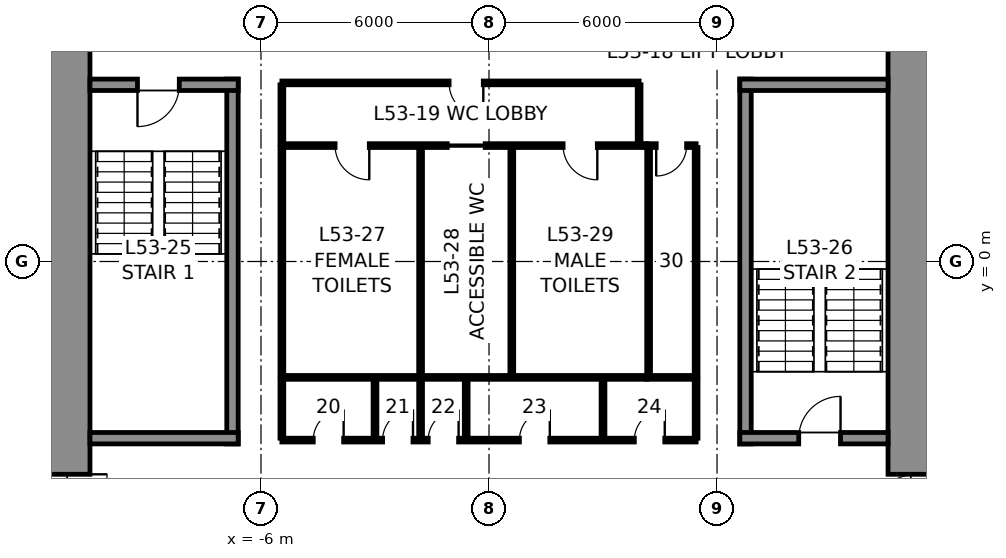
"""IFC4 building model, lengths in metres.
Left out: names, types, materials, properties, quantities, classifications, styles, units other than length and angle.
Written with IfcOpenShell. Run it as: python <this file> out.ifc"""

import sys

from ifc_helpers import new_model, si_unit, direction, frame, frame_2d, origin, place, context, subcontext, project, spatial, rectangle, extrude, element, fill, save


model = new_model("IFC4")
c1 = context("Model", 3, precision=1e-05, world=origin(), true_north=direction((0.0, 1.0)))
c2 = subcontext(c1, "Body", "Model", "MODEL_VIEW")
j1 = project(units=[si_unit("LENGTHUNIT", "METRE"), si_unit("PLANEANGLEUNIT", "RADIAN")], contexts=[c1])
p1 = place(None, origin())
s1 = spatial("IfcSite", under=j1, at=p1, CompositionType="ELEMENT")
p2 = place(p1, origin())
s2 = spatial("IfcBuilding", under=s1, at=p2, CompositionType="ELEMENT")
p3 = place(p2, frame((0.0, 0.0, 241.8)))
s3 = spatial("IfcBuildingStorey", under=s2, at=p3, CompositionType="ELEMENT", Elevation=241.8)
p4 = place(p3, frame((11.25, 10.5, 0.0), z_axis=(0.0, 0.0, 1.0), x_axis=(0.0, -1.0, 0.0)))
e1 = element("IfcWall", 1, at=p4, inside=s3, PredefinedType="SHEAR", context=c2, shape_type="SweptSolid", body=[
    extrude(rectangle(XDim=21.0, YDim=1.5, at=frame_2d((10.5, 0.0))), origin(), (0.0, 0.0, 1.0), 4.0),
])
p5 = place(p4, frame((3.7, 0.0, 0.0)))
e2 = element("IfcOpeningElement", 2, at=p5, cuts=e1, PredefinedType="OPENING", context=c2, shape_type="SweptSolid", body=[
    extrude(rectangle(XDim=1.2, YDim=2.3, at=frame_2d((0.6, 1.15))), frame((0.0, 0.76, 0.0), z_axis=(0.0, -1.0, 0.0), x_axis=(1.0, 0.0, 0.0)), (0.0, 0.0, 1.0), 1.52),
])
p6 = place(p4, frame((16.1, 0.0, 0.0)))
e3 = element("IfcOpeningElement", 3, at=p6, cuts=e1, PredefinedType="OPENING", context=c2, shape_type="SweptSolid", body=[
    extrude(rectangle(XDim=1.2, YDim=2.3, at=frame_2d((0.6, 1.15))), frame((0.0, 0.76, 0.0), z_axis=(0.0, -1.0, 0.0), x_axis=(1.0, 0.0, 0.0)), (0.0, 0.0, 1.0), 1.52),
])
p7 = place(p3, frame((-11.25, -10.5, 0.0), z_axis=(0.0, 0.0, 1.0), x_axis=(0.0, 1.0, 0.0)))
e4 = element("IfcWall", 4, at=p7, inside=s3, PredefinedType="SHEAR", context=c2, shape_type="SweptSolid", body=[
    extrude(rectangle(XDim=21.0, YDim=1.5, at=frame_2d((10.5, 0.0))), origin(), (0.0, 0.0, 1.0), 4.0),
])
p8 = place(p7, frame((16.1, 0.0, 0.0)))
e5 = element("IfcOpeningElement", 5, at=p8, cuts=e4, PredefinedType="OPENING", context=c2, shape_type="SweptSolid", body=[
    extrude(rectangle(XDim=1.2, YDim=2.3, at=frame_2d((0.6, 1.15))), frame((0.0, 0.76, 0.0), z_axis=(0.0, -1.0, 0.0), x_axis=(1.0, 0.0, 0.0)), (0.0, 0.0, 1.0), 1.52),
])
p9 = place(p7, frame((3.7, 0.0, 0.0)))
e6 = element("IfcOpeningElement", 6, at=p9, cuts=e4, PredefinedType="OPENING", context=c2, shape_type="SweptSolid", body=[
    extrude(rectangle(XDim=1.2, YDim=2.3, at=frame_2d((0.6, 1.15))), frame((0.0, 0.76, 0.0), z_axis=(0.0, -1.0, 0.0), x_axis=(1.0, 0.0, 0.0)), (0.0, 0.0, 1.0), 1.52),
])
p10 = place(p3, frame((-6.75, -4.8, 0.0), z_axis=(0.0, 0.0, 1.0), x_axis=(0.0, 1.0, 0.0)))
e7 = element("IfcWall", 7, at=p10, inside=s3, PredefinedType="SOLIDWALL", context=c2, shape_type="SweptSolid", body=[
    extrude(rectangle(XDim=9.6, YDim=0.3, at=frame_2d((4.8, 0.0))), origin(), (0.0, 0.0, 1.0), 3.75),
])
p11 = place(p3, frame((-10.5, 4.65, 0.0), z_axis=(0.0, 0.0, 1.0), x_axis=(1.0, 0.0, 0.0)))
e8 = element("IfcWall", 8, at=p11, inside=s3, PredefinedType="SOLIDWALL", context=c2, shape_type="SweptSolid", body=[
    extrude(rectangle(XDim=3.9, YDim=0.3, at=frame_2d((1.95, 0.0))), origin(), (0.0, 0.0, 1.0), 3.75),
])
p12 = place(p11, frame((1.25, 0.0, 0.0)))
e9 = element("IfcOpeningElement", 9, at=p12, cuts=e8, PredefinedType="OPENING", context=c2, shape_type="SweptSolid", body=[
    extrude(rectangle(XDim=1.1, YDim=2.3, at=frame_2d((0.55, 1.15))), frame((0.0, 0.16, 0.0), z_axis=(0.0, -1.0, 0.0), x_axis=(1.0, 0.0, 0.0)), (0.0, 0.0, 1.0), 0.32),
])
p13 = place(p3, frame((-6.6, -4.65, 0.0), z_axis=(0.0, 0.0, 1.0), x_axis=(-1.0, 0.0, 0.0)))
e10 = element("IfcWall", 10, at=p13, inside=s3, PredefinedType="SOLIDWALL", context=c2, shape_type="SweptSolid", body=[
    extrude(rectangle(XDim=3.9, YDim=0.3, at=frame_2d((1.95, 0.0))), origin(), (0.0, 0.0, 1.0), 3.75),
])
p14 = place(p3, frame((6.75, -4.8, 0.0), z_axis=(0.0, 0.0, 1.0), x_axis=(0.0, 1.0, 0.0)))
e11 = element("IfcWall", 11, at=p14, inside=s3, PredefinedType="SOLIDWALL", context=c2, shape_type="SweptSolid", body=[
    extrude(rectangle(XDim=9.6, YDim=0.3, at=frame_2d((4.8, 0.0))), origin(), (0.0, 0.0, 1.0), 3.75),
])
p15 = place(p3, frame((6.6, 4.65, 0.0), z_axis=(0.0, 0.0, 1.0), x_axis=(1.0, 0.0, 0.0)))
e12 = element("IfcWall", 12, at=p15, inside=s3, PredefinedType="SOLIDWALL", context=c2, shape_type="SweptSolid", body=[
    extrude(rectangle(XDim=3.9, YDim=0.3, at=frame_2d((1.95, 0.0))), origin(), (0.0, 0.0, 1.0), 3.75),
])
p16 = place(p3, frame((10.5, -4.65, 0.0), z_axis=(0.0, 0.0, 1.0), x_axis=(-1.0, 0.0, 0.0)))
e13 = element("IfcWall", 13, at=p16, inside=s3, PredefinedType="SOLIDWALL", context=c2, shape_type="SweptSolid", body=[
    extrude(rectangle(XDim=3.9, YDim=0.3, at=frame_2d((1.95, 0.0))), origin(), (0.0, 0.0, 1.0), 3.75),
])
p17 = place(p16, frame((1.25, 0.0, 0.0)))
e14 = element("IfcOpeningElement", 14, at=p17, cuts=e13, PredefinedType="OPENING", context=c2, shape_type="SweptSolid", body=[
    extrude(rectangle(XDim=1.1, YDim=2.3, at=frame_2d((0.55, 1.15))), frame((0.0, 0.16, 0.0), z_axis=(0.0, -1.0, 0.0), x_axis=(1.0, 0.0, 0.0)), (0.0, 0.0, 1.0), 0.32),
])
p18 = place(p3, frame((-5.45, 3.05, 0.0), z_axis=(0.0, 0.0, 1.0), x_axis=(1.0, 0.0, 0.0)))
e15 = element("IfcWall", 15, at=p18, inside=s3, PredefinedType="PARTITIONING", context=c2, shape_type="SweptSolid", body=[
    extrude(rectangle(XDim=9.6, YDim=0.1, at=frame_2d((4.8, 0.0))), origin(), (0.0, 0.0, 1.0), 3.75),
])
p19 = place(p18, frame((1.4, 0.0, 0.0)))
e16 = element("IfcOpeningElement", 16, at=p19, cuts=e15, PredefinedType="OPENING", context=c2, shape_type="SweptSolid", body=[
    extrude(rectangle(XDim=0.9, YDim=2.3, at=frame_2d((0.45, 1.15))), frame((0.0, 0.06, 0.0), z_axis=(0.0, -1.0, 0.0), x_axis=(1.0, 0.0, 0.0)), (0.0, 0.0, 1.0), 0.12),
])
p20 = place(p18, frame((4.35, 0.0, 0.0)))
e17 = element("IfcOpeningElement", 17, at=p20, cuts=e15, PredefinedType="OPENING", context=c2, shape_type="SweptSolid", body=[
    extrude(rectangle(XDim=1.0, YDim=2.3, at=frame_2d((0.5, 1.15))), frame((0.0, 0.06, 0.0), z_axis=(0.0, -1.0, 0.0), x_axis=(1.0, 0.0, 0.0)), (0.0, 0.0, 1.0), 0.12),
])
p21 = place(p18, frame((7.4, 0.0, 0.0)))
e18 = element("IfcOpeningElement", 18, at=p21, cuts=e15, PredefinedType="OPENING", context=c2, shape_type="SweptSolid", body=[
    extrude(rectangle(XDim=0.9, YDim=2.3, at=frame_2d((0.45, 1.15))), frame((0.0, 0.06, 0.0), z_axis=(0.0, -1.0, 0.0), x_axis=(1.0, 0.0, 0.0)), (0.0, 0.0, 1.0), 0.12),
])
p22 = place(p3, frame((4.15, 3.05, 0.0), z_axis=(0.0, 0.0, 1.0), x_axis=(1.0, 0.0, 0.0)))
e19 = element("IfcWall", 19, at=p22, inside=s3, PredefinedType="PARTITIONING", context=c2, shape_type="SweptSolid", body=[
    extrude(rectangle(XDim=1.3, YDim=0.1, at=frame_2d((0.65, 0.0))), origin(), (0.0, 0.0, 1.0), 3.75),
])
p23 = place(p22, frame((0.25, 0.0, 0.0)))
e20 = element("IfcOpeningElement", 20, at=p23, cuts=e19, PredefinedType="OPENING", context=c2, shape_type="SweptSolid", body=[
    extrude(rectangle(XDim=0.8, YDim=2.3, at=frame_2d((0.4, 1.15))), frame((0.0, 0.06, 0.0), z_axis=(0.0, -1.0, 0.0), x_axis=(1.0, 0.0, 0.0)), (0.0, 0.0, 1.0), 0.12),
])
p24 = place(p3, frame((4.15, -3.05, 0.0), z_axis=(0.0, 0.0, 1.0), x_axis=(-1.0, 0.0, 0.0)))
e21 = element("IfcWall", 21, at=p24, inside=s3, PredefinedType="PARTITIONING", context=c2, shape_type="SweptSolid", body=[
    extrude(rectangle(XDim=9.6, YDim=0.1, at=frame_2d((4.8, 0.0))), origin(), (0.0, 0.0, 1.0), 3.75),
])
p25 = place(p3, frame((5.45, -3.05, 0.0), z_axis=(0.0, 0.0, 1.0), x_axis=(-1.0, 0.0, 0.0)))
e22 = element("IfcWall", 22, at=p25, inside=s3, PredefinedType="PARTITIONING", context=c2, shape_type="SweptSolid", body=[
    extrude(rectangle(XDim=1.3, YDim=0.1, at=frame_2d((0.65, 0.0))), origin(), (0.0, 0.0, 1.0), 3.75),
])
for number, where, z_axis, x_axis in (
    (23, (5.45, 3.0, 0.0), (0.0, 0.0, 1.0), (0.0, -1.0, 0.0)),
    (24, (-5.45, -3.0, 0.0), (0.0, 0.0, 1.0), (0.0, 1.0, 0.0)),
    (25, (-1.8, -3.0, 0.0), (0.0, 0.0, 1.0), (0.0, 1.0, 0.0)),
    (26, (0.6, -3.0, 0.0), (0.0, 0.0, 1.0), (0.0, 1.0, 0.0)),
    (27, (4.2, -3.0, 0.0), (0.0, 0.0, 1.0), (0.0, 1.0, 0.0)),
):
    element("IfcWall", number, at=place(p3, frame(where, z_axis=z_axis, x_axis=x_axis)), inside=s3, PredefinedType="PARTITIONING", context=c2, shape_type="SweptSolid", body=[
        extrude(rectangle(XDim=6.0, YDim=0.1, at=frame_2d((3.0, 0.0))), origin(), (0.0, 0.0, 1.0), 3.75),
    ])
p26 = place(p3, frame((-5.45, 4.7, 0.0), z_axis=(0.0, 0.0, 1.0), x_axis=(1.0, 0.0, 0.0)))
e28 = element("IfcWall", 28, at=p26, inside=s3, PredefinedType="PARTITIONING", context=c2, shape_type="SweptSolid", body=[
    extrude(rectangle(XDim=9.4, YDim=0.1, at=frame_2d((4.7, 0.0))), origin(), (0.0, 0.0, 1.0), 3.75),
])
p27 = place(p26, frame((4.4, 0.0, 0.0)))
e29 = element("IfcOpeningElement", 29, at=p27, cuts=e28, PredefinedType="OPENING", context=c2, shape_type="SweptSolid", body=[
    extrude(rectangle(XDim=0.9, YDim=2.3, at=frame_2d((0.45, 1.15))), frame((0.0, 0.06, 0.0), z_axis=(0.0, -1.0, 0.0), x_axis=(1.0, 0.0, 0.0)), (0.0, 0.0, 1.0), 0.12),
])
for number, where, z_axis, x_axis in (
    (30, (-5.45, 3.1, 0.0), (0.0, 0.0, 1.0), (0.0, 1.0, 0.0)),
    (31, (3.95, 3.1, 0.0), (0.0, 0.0, 1.0), (0.0, 1.0, 0.0)),
):
    element("IfcWall", number, at=place(p3, frame(where, z_axis=z_axis, x_axis=x_axis)), inside=s3, PredefinedType="PARTITIONING", context=c2, shape_type="SweptSolid", body=[
        extrude(rectangle(XDim=1.55, YDim=0.1, at=frame_2d((0.775, 0.0))), origin(), (0.0, 0.0, 1.0), 3.75),
    ])
p28 = place(p3, frame((5.45, -4.7, 0.0), z_axis=(0.0, 0.0, 1.0), x_axis=(-1.0, 0.0, 0.0)))
e32 = element("IfcWall", 32, at=p28, inside=s3, PredefinedType="PARTITIONING", context=c2, shape_type="SweptSolid", body=[
    extrude(rectangle(XDim=10.9, YDim=0.1, at=frame_2d((5.45, 0.0))), origin(), (0.0, 0.0, 1.0), 3.75),
])
p29 = place(p28, frame((9.275, 0.0, 0.0)))
e33 = element("IfcOpeningElement", 33, at=p29, cuts=e32, PredefinedType="OPENING", context=c2, shape_type="SweptSolid", body=[
    extrude(rectangle(XDim=0.8, YDim=2.3, at=frame_2d((0.4, 1.15))), frame((0.0, 0.06, 0.0), z_axis=(0.0, -1.0, 0.0), x_axis=(1.0, 0.0, 0.0)), (0.0, 0.0, 1.0), 0.12),
])
p30 = place(p28, frame((7.45, 0.0, 0.0)))
e34 = element("IfcOpeningElement", 34, at=p30, cuts=e32, PredefinedType="OPENING", context=c2, shape_type="SweptSolid", body=[
    extrude(rectangle(XDim=0.8, YDim=2.3, at=frame_2d((0.4, 1.15))), frame((0.0, 0.06, 0.0), z_axis=(0.0, -1.0, 0.0), x_axis=(1.0, 0.0, 0.0)), (0.0, 0.0, 1.0), 0.12),
])
p31 = place(p28, frame((6.25, 0.0, 0.0)))
e35 = element("IfcOpeningElement", 35, at=p31, cuts=e32, PredefinedType="OPENING", context=c2, shape_type="SweptSolid", body=[
    extrude(rectangle(XDim=0.8, YDim=2.3, at=frame_2d((0.4, 1.15))), frame((0.0, 0.06, 0.0), z_axis=(0.0, -1.0, 0.0), x_axis=(1.0, 0.0, 0.0)), (0.0, 0.0, 1.0), 0.12),
])
p32 = place(p28, frame((3.85, 0.0, 0.0)))
e36 = element("IfcOpeningElement", 36, at=p32, cuts=e32, PredefinedType="OPENING", context=c2, shape_type="SweptSolid", body=[
    extrude(rectangle(XDim=0.8, YDim=2.3, at=frame_2d((0.4, 1.15))), frame((0.0, 0.06, 0.0), z_axis=(0.0, -1.0, 0.0), x_axis=(1.0, 0.0, 0.0)), (0.0, 0.0, 1.0), 0.12),
])
p33 = place(p28, frame((0.825, 0.0, 0.0)))
e37 = element("IfcOpeningElement", 37, at=p33, cuts=e32, PredefinedType="OPENING", context=c2, shape_type="SweptSolid", body=[
    extrude(rectangle(XDim=0.8, YDim=2.3, at=frame_2d((0.4, 1.15))), frame((0.0, 0.06, 0.0), z_axis=(0.0, -1.0, 0.0), x_axis=(1.0, 0.0, 0.0)), (0.0, 0.0, 1.0), 0.12),
])
for number, where, z_axis, x_axis in (
    (38, (-5.45, -3.1, 0.0), (0.0, 0.0, 1.0), (0.0, -1.0, 0.0)),
    (39, (5.45, -3.1, 0.0), (0.0, 0.0, 1.0), (0.0, -1.0, 0.0)),
    (40, (-3.0, -3.1, 0.0), (0.0, 0.0, 1.0), (0.0, -1.0, 0.0)),
    (41, (-1.8, -3.1, 0.0), (0.0, 0.0, 1.0), (0.0, -1.0, 0.0)),
    (42, (-0.6, -3.1, 0.0), (0.0, 0.0, 1.0), (0.0, -1.0, 0.0)),
    (43, (3.0, -3.1, 0.0), (0.0, 0.0, 1.0), (0.0, -1.0, 0.0)),
):
    element("IfcWall", number, at=place(p3, frame(where, z_axis=z_axis, x_axis=x_axis)), inside=s3, PredefinedType="PARTITIONING", context=c2, shape_type="SweptSolid", body=[
        extrude(rectangle(XDim=1.55, YDim=0.1, at=frame_2d((0.775, 0.0))), origin(), (0.0, 0.0, 1.0), 3.75),
    ])
p34 = place(p12, frame((1.1, 0.0, 0.0), z_axis=(0.0, 0.0, 1.0), x_axis=(-1.0, 0.0, 0.0)))
e44 = element("IfcDoor", 44, at=p34, inside=s3, OperationType="SINGLE_SWING_RIGHT", PredefinedType="DOOR", context=c2, shape_type="SweptSolid", body=[
    extrude(rectangle(XDim=1.1, YDim=2.3, at=frame_2d((0.55, 1.15))), frame((0.0, 0.025, 0.0), z_axis=(0.0, -1.0, 0.0), x_axis=(1.0, 0.0, 0.0)), (0.0, 0.0, 1.0), 0.05),
])
fill(e9, e44)
p35 = place(p17, frame((1.1, 0.0, 0.0), z_axis=(0.0, 0.0, 1.0), x_axis=(-1.0, 0.0, 0.0)))
e45 = element("IfcDoor", 45, at=p35, inside=s3, OperationType="SINGLE_SWING_RIGHT", PredefinedType="DOOR", context=c2, shape_type="SweptSolid", body=[
    extrude(rectangle(XDim=1.1, YDim=2.3, at=frame_2d((0.55, 1.15))), frame((0.0, 0.025, 0.0), z_axis=(0.0, -1.0, 0.0), x_axis=(1.0, 0.0, 0.0)), (0.0, 0.0, 1.0), 0.05),
])
fill(e14, e45)
p36 = place(p19, frame((0.9, 0.0, 0.0), z_axis=(0.0, 0.0, 1.0), x_axis=(-1.0, 0.0, 0.0)))
e46 = element("IfcDoor", 46, at=p36, inside=s3, OperationType="SINGLE_SWING_LEFT", PredefinedType="DOOR", context=c2, shape_type="SweptSolid", body=[
    extrude(rectangle(XDim=0.9, YDim=2.3, at=frame_2d((0.45, 1.15))), frame((0.0, 0.025, 0.0), z_axis=(0.0, -1.0, 0.0), x_axis=(1.0, 0.0, 0.0)), (0.0, 0.0, 1.0), 0.05),
])
fill(e16, e46)
p37 = place(p20, frame((1.0, 0.0, 0.0), z_axis=(0.0, 0.0, 1.0), x_axis=(-1.0, 0.0, 0.0)))
e47 = element("IfcDoor", 47, at=p37, inside=s3, OperationType="SLIDING_TO_LEFT", PredefinedType="DOOR", context=c2, shape_type="SweptSolid", body=[
    extrude(rectangle(XDim=1.0, YDim=2.3, at=frame_2d((0.5, 1.15))), frame((0.0, 0.025, 0.0), z_axis=(0.0, -1.0, 0.0), x_axis=(1.0, 0.0, 0.0)), (0.0, 0.0, 1.0), 0.05),
])
fill(e17, e47)
p38 = place(p21, frame((0.9, 0.0, 0.0), z_axis=(0.0, 0.0, 1.0), x_axis=(-1.0, 0.0, 0.0)))
e48 = element("IfcDoor", 48, at=p38, inside=s3, OperationType="SINGLE_SWING_LEFT", PredefinedType="DOOR", context=c2, shape_type="SweptSolid", body=[
    extrude(rectangle(XDim=0.9, YDim=2.3, at=frame_2d((0.45, 1.15))), frame((0.0, 0.025, 0.0), z_axis=(0.0, -1.0, 0.0), x_axis=(1.0, 0.0, 0.0)), (0.0, 0.0, 1.0), 0.05),
])
fill(e18, e48)
p39 = place(p23, frame((0.8, 0.0, 0.0), z_axis=(0.0, 0.0, 1.0), x_axis=(-1.0, 0.0, 0.0)))
e49 = element("IfcDoor", 49, at=p39, inside=s3, OperationType="SINGLE_SWING_RIGHT", PredefinedType="DOOR", context=c2, shape_type="SweptSolid", body=[
    extrude(rectangle(XDim=0.8, YDim=2.3, at=frame_2d((0.4, 1.15))), frame((0.0, 0.025, 0.0), z_axis=(0.0, -1.0, 0.0), x_axis=(1.0, 0.0, 0.0)), (0.0, 0.0, 1.0), 0.05),
])
fill(e20, e49)
p40 = place(p27, frame((0.9, 0.0, 0.0), z_axis=(0.0, 0.0, 1.0), x_axis=(-1.0, 0.0, 0.0)))
e50 = element("IfcDoor", 50, at=p40, inside=s3, OperationType="SINGLE_SWING_LEFT", PredefinedType="DOOR", context=c2, shape_type="SweptSolid", body=[
    extrude(rectangle(XDim=0.9, YDim=2.3, at=frame_2d((0.45, 1.15))), frame((0.0, 0.025, 0.0), z_axis=(0.0, -1.0, 0.0), x_axis=(1.0, 0.0, 0.0)), (0.0, 0.0, 1.0), 0.05),
])
fill(e29, e50)
p41 = place(p29, frame((0.8, 0.0, 0.0), z_axis=(0.0, 0.0, 1.0), x_axis=(-1.0, 0.0, 0.0)))
e51 = element("IfcDoor", 51, at=p41, inside=s3, OperationType="SINGLE_SWING_RIGHT", PredefinedType="DOOR", context=c2, shape_type="SweptSolid", body=[
    extrude(rectangle(XDim=0.8, YDim=2.3, at=frame_2d((0.4, 1.15))), frame((0.0, 0.025, 0.0), z_axis=(0.0, -1.0, 0.0), x_axis=(1.0, 0.0, 0.0)), (0.0, 0.0, 1.0), 0.05),
])
fill(e33, e51)
p42 = place(p30, frame((0.8, 0.0, 0.0), z_axis=(0.0, 0.0, 1.0), x_axis=(-1.0, 0.0, 0.0)))
e52 = element("IfcDoor", 52, at=p42, inside=s3, OperationType="SINGLE_SWING_RIGHT", PredefinedType="DOOR", context=c2, shape_type="SweptSolid", body=[
    extrude(rectangle(XDim=0.8, YDim=2.3, at=frame_2d((0.4, 1.15))), frame((0.0, 0.025, 0.0), z_axis=(0.0, -1.0, 0.0), x_axis=(1.0, 0.0, 0.0)), (0.0, 0.0, 1.0), 0.05),
])
fill(e34, e52)
p43 = place(p31, frame((0.8, 0.0, 0.0), z_axis=(0.0, 0.0, 1.0), x_axis=(-1.0, 0.0, 0.0)))
e53 = element("IfcDoor", 53, at=p43, inside=s3, OperationType="SINGLE_SWING_RIGHT", PredefinedType="DOOR", context=c2, shape_type="SweptSolid", body=[
    extrude(rectangle(XDim=0.8, YDim=2.3, at=frame_2d((0.4, 1.15))), frame((0.0, 0.025, 0.0), z_axis=(0.0, -1.0, 0.0), x_axis=(1.0, 0.0, 0.0)), (0.0, 0.0, 1.0), 0.05),
])
fill(e35, e53)
p44 = place(p32, frame((0.8, 0.0, 0.0), z_axis=(0.0, 0.0, 1.0), x_axis=(-1.0, 0.0, 0.0)))
e54 = element("IfcDoor", 54, at=p44, inside=s3, OperationType="SINGLE_SWING_RIGHT", PredefinedType="DOOR", context=c2, shape_type="SweptSolid", body=[
    extrude(rectangle(XDim=0.8, YDim=2.3, at=frame_2d((0.4, 1.15))), frame((0.0, 0.025, 0.0), z_axis=(0.0, -1.0, 0.0), x_axis=(1.0, 0.0, 0.0)), (0.0, 0.0, 1.0), 0.05),
])
fill(e36, e54)
p45 = place(p33, frame((0.8, 0.0, 0.0), z_axis=(0.0, 0.0, 1.0), x_axis=(-1.0, 0.0, 0.0)))
e55 = element("IfcDoor", 55, at=p45, inside=s3, OperationType="SINGLE_SWING_RIGHT", PredefinedType="DOOR", context=c2, shape_type="SweptSolid", body=[
    extrude(rectangle(XDim=0.8, YDim=2.3, at=frame_2d((0.4, 1.15))), frame((0.0, 0.025, 0.0), z_axis=(0.0, -1.0, 0.0), x_axis=(1.0, 0.0, 0.0)), (0.0, 0.0, 1.0), 0.05),
])
fill(e37, e55)
p46 = place(p9, frame((1.2, 0.0, 0.0), z_axis=(0.0, 0.0, 1.0), x_axis=(-1.0, 0.0, 0.0)))
e56 = element("IfcDoor", 56, at=p46, inside=s3, OperationType="SINGLE_SWING_LEFT", PredefinedType="DOOR", context=c2, shape_type="SweptSolid", body=[
    extrude(rectangle(XDim=1.2, YDim=2.3, at=frame_2d((0.6, 1.15))), frame((0.0, 0.025, 0.0), z_axis=(0.0, -1.0, 0.0), x_axis=(1.0, 0.0, 0.0)), (0.0, 0.0, 1.0), 0.05),
])
fill(e6, e56)
p47 = place(p6, frame((1.2, 0.0, 0.0), z_axis=(0.0, 0.0, 1.0), x_axis=(-1.0, 0.0, 0.0)))
e57 = element("IfcDoor", 57, at=p47, inside=s3, OperationType="SINGLE_SWING_LEFT", PredefinedType="DOOR", context=c2, shape_type="SweptSolid", body=[
    extrude(rectangle(XDim=1.2, YDim=2.3, at=frame_2d((0.6, 1.15))), frame((0.0, 0.025, 0.0), z_axis=(0.0, -1.0, 0.0), x_axis=(1.0, 0.0, 0.0)), (0.0, 0.0, 1.0), 0.05),
])
fill(e3, e57)
save(model, sys.argv[1])
